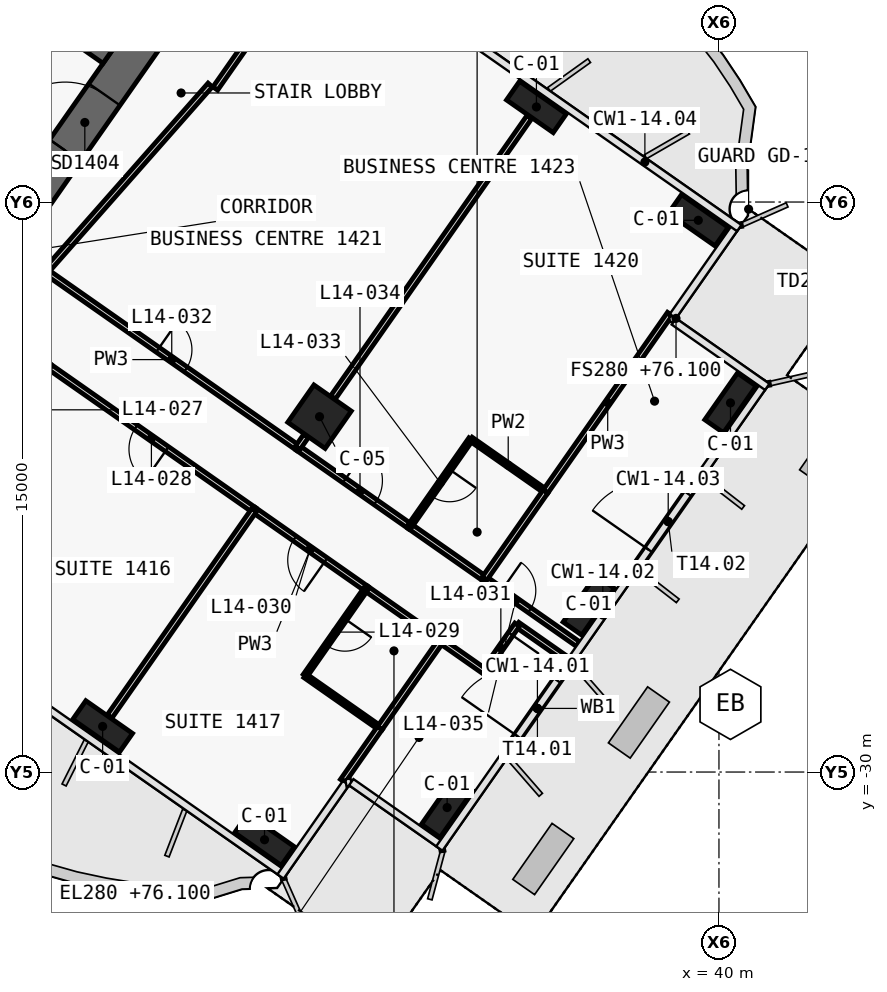
"""IFC4 building model, lengths in metres.
Left out: names, types, materials, properties, quantities, classifications, styles, units other than length and angle.
Written with IfcOpenShell. Run it as: python <this file> out.ifc"""

import sys

from ifc_helpers import new_model, si_unit, direction, frame, frame_2d, origin, origin_2d, place, context, subcontext, project, spatial, polyline, rectangle, outline, extrude, element, fill, save


model = new_model("IFC4")
c1 = context("Model", 3, precision=1e-05, world=origin(), true_north=direction((0.0, 1.0)))
c2 = subcontext(c1, "Body", "Model", "MODEL_VIEW")
j1 = project(units=[si_unit("LENGTHUNIT", "METRE"), si_unit("PLANEANGLEUNIT", "RADIAN")], contexts=[c1])
p1 = place(None, origin())
s1 = spatial("IfcSite", under=j1, at=p1, CompositionType="ELEMENT")
p2 = place(p1, origin())
s2 = spatial("IfcBuilding", under=s1, at=p2, CompositionType="ELEMENT")
p3 = place(p2, frame((0.0, 0.0, 76.1)))
s3 = spatial("IfcBuildingStorey", under=s2, at=p3, CompositionType="ELEMENT", Elevation=76.1)
p4 = place(p3, frame((21.708, -15.2, 0.0), z_axis=(0.0, 0.0, 1.0), x_axis=(0.573576324356, 0.819152122709, 0.0)))
e1 = element("IfcWall", 1, at=p4, inside=s3, PredefinedType="SHEAR", context=c2, shape_type="SweptSolid", body=[
    extrude(outline(polyline([(9.2, 0.5), (0.0, 0.5), (0.0, -0.5), (9.2, -0.5), (9.2, 0.5)])), origin(), (0.0, 0.0, 1.0), 3.6),
])
p5 = place(p4, frame((6.1, 0.0, 0.0)))
e2 = element("IfcOpeningElement", 2, at=p5, cuts=e1, PredefinedType="OPENING", context=c2, shape_type="SweptSolid", body=[
    extrude(rectangle(XDim=1.8, YDim=2.1, at=frame_2d((0.9, 1.05))), frame((0.0, 0.51, 0.0), z_axis=(0.0, -1.0, 0.0), x_axis=(1.0, 0.0, 0.0)), (0.0, 0.0, 1.0), 1.02),
])
p6 = place(p4, frame((1.9, 0.0, 0.0)))
e3 = element("IfcOpeningElement", 3, at=p6, cuts=e1, PredefinedType="OPENING", context=c2, shape_type="SweptSolid", body=[
    extrude(rectangle(XDim=1.8, YDim=2.1, at=frame_2d((0.9, 1.05))), frame((0.0, 0.51, 0.0), z_axis=(0.0, -1.0, 0.0), x_axis=(1.0, 0.0, 0.0)), (0.0, 0.0, 1.0), 1.02),
])
p7 = place(p3, frame((2.638, 3.768, 0.0), z_axis=(0.0, 0.0, 1.0), x_axis=(0.819148977158, -0.573580816643, 0.0)))
e4 = element("IfcWall", 4, at=p7, inside=s3, PredefinedType="SHEAR", context=c2, shape_type="SweptSolid", body=[
    extrude(outline(polyline([(0.0, 0.25), (0.0, -0.25), (26.0, -0.25), (26.0, 0.25), (0.0, 0.25)])), origin(), (0.0, 0.0, 1.0), 3.6),
])
p8 = place(p7, frame((9.637, 0.0, 0.0)))
e5 = element("IfcOpeningElement", 5, at=p8, cuts=e4, PredefinedType="OPENING", context=c2, shape_type="SweptSolid", body=[
    extrude(rectangle(XDim=1.2, YDim=2.1, at=frame_2d((0.6, 1.05))), frame((0.0, 0.26, 0.0), z_axis=(0.0, -1.0, 0.0), x_axis=(1.0, 0.0, 0.0)), (0.0, 0.0, 1.0), 0.52),
])
p9 = place(p7, frame((11.812, 0.0, 0.0)))
e6 = element("IfcOpeningElement", 6, at=p9, cuts=e4, PredefinedType="OPENING", context=c2, shape_type="SweptSolid", body=[
    extrude(rectangle(XDim=1.2, YDim=2.1, at=frame_2d((0.6, 1.05))), frame((0.0, 0.26, 0.0), z_axis=(0.0, -1.0, 0.0), x_axis=(1.0, 0.0, 0.0)), (0.0, 0.0, 1.0), 0.52),
])
p10 = place(p7, frame((13.988, 0.0, 0.0)))
e7 = element("IfcOpeningElement", 7, at=p10, cuts=e4, PredefinedType="OPENING", context=c2, shape_type="SweptSolid", body=[
    extrude(rectangle(XDim=1.2, YDim=2.1, at=frame_2d((0.6, 1.05))), frame((0.0, 0.26, 0.0), z_axis=(0.0, -1.0, 0.0), x_axis=(1.0, 0.0, 0.0)), (0.0, 0.0, 1.0), 0.52),
])
p11 = place(p7, frame((16.262, 0.0, 0.0)))
e8 = element("IfcOpeningElement", 8, at=p11, cuts=e4, PredefinedType="OPENING", context=c2, shape_type="SweptSolid", body=[
    extrude(rectangle(XDim=1.0, YDim=2.1, at=frame_2d((0.5, 1.05))), frame((0.0, 0.26, 0.0), z_axis=(0.0, -1.0, 0.0), x_axis=(1.0, 0.0, 0.0)), (0.0, 0.0, 1.0), 0.52),
])
for number, where, z_axis, x_axis in (
    (9, (23.782, -28.799, 0.0), (0.0, 0.0, 1.0), (0.819, -0.574, 0.0)),
    (10, (28.042, -31.782, 0.0), (0.0, 0.0, 1.0), (0.819, -0.574, 0.0)),
    (11, (35.197, -12.498, 0.0), (0.0, 0.0, 1.0), (0.819, -0.574, 0.0)),
    (12, (39.456, -15.481, 0.0), (0.0, 0.0, 1.0), (0.819, -0.574, 0.0)),
    (13, (32.847, -30.935, 0.0), (0.0, 0.0, 1.0), (0.574, 0.819, 0.0)),
    (14, (36.575, -25.61, 0.0), (0.0, 0.0, 1.0), (0.574, 0.819, 0.0)),
    (15, (40.303, -20.286, 0.0), (0.0, 0.0, 1.0), (0.574, 0.819, 0.0)),
):
    element("IfcColumn", number, at=place(p3, frame(where, z_axis=z_axis, x_axis=x_axis)), inside=s3, PredefinedType="COLUMN", context=c2, shape_type="SweptSolid", body=[
        extrude(rectangle(XDim=1.5, YDim=0.6, at=origin_2d()), origin(), (0.0, 0.0, 1.0), 3.6),
    ])
p12 = place(p3, frame((29.49, -20.649, 0.0), z_axis=(0.0, 0.0, 1.0), x_axis=(0.819152044289, -0.573576436351, 0.0)))
e16 = element("IfcColumn", 16, at=p12, inside=s3, PredefinedType="COLUMN", context=c2, shape_type="SweptSolid", body=[
    extrude(rectangle(XDim=1.2, YDim=1.2, at=origin_2d()), origin(), (0.0, 0.0, 1.0), 3.6),
])
p13 = place(p3, frame((34.38, -29.53, 0.0), z_axis=(0.0, 0.0, 1.0), x_axis=(0.573584953252, 0.819146080625, 0.0)))
e17 = element("IfcWall", 17, at=p13, inside=s3, PredefinedType="SOLIDWALL", context=c2, shape_type="SweptSolid", body=[
    extrude(rectangle(XDim=2.94, YDim=0.2, at=frame_2d((1.47, 0.0))), origin(), (0.0, 0.0, 1.0), 3.32),
])
p14 = place(p13, frame((0.57, 0.0, 0.0)))
e18 = element("IfcOpeningElement", 18, at=p14, cuts=e17, PredefinedType="OPENING", context=c2, shape_type="SweptSolid", body=[
    extrude(rectangle(XDim=1.8, YDim=2.4, at=frame_2d((0.9, 1.2))), frame((0.0, 0.11, 0.0), z_axis=(0.0, -1.0, 0.0), x_axis=(1.0, 0.0, 0.0)), (0.0, 0.0, 1.0), 0.22),
])
p15 = place(p3, frame((37.821, -24.615, 0.0), z_axis=(0.0, 0.0, 1.0), x_axis=(0.573584953252, 0.819146080625, 0.0)))
e19 = element("IfcWall", 19, at=p15, inside=s3, PredefinedType="SOLIDWALL", context=c2, shape_type="SweptSolid", body=[
    extrude(rectangle(XDim=2.94, YDim=0.2, at=frame_2d((1.47, 0.0))), origin(), (0.0, 0.0, 1.0), 3.32),
])
p16 = place(p15, frame((0.57, 0.0, 0.0)))
e20 = element("IfcOpeningElement", 20, at=p16, cuts=e19, PredefinedType="OPENING", context=c2, shape_type="SweptSolid", body=[
    extrude(rectangle(XDim=1.8, YDim=2.4, at=frame_2d((0.9, 1.2))), frame((0.0, 0.11, 0.0), z_axis=(0.0, -1.0, 0.0), x_axis=(1.0, 0.0, 0.0)), (0.0, 0.0, 1.0), 0.22),
])
p17 = place(p3, frame((22.284, -16.824, 0.0), z_axis=(0.0, 0.0, 1.0), x_axis=(0.819152599934, -0.573575642807, 0.0)))
e21 = element("IfcWall", 21, at=p17, inside=s3, PredefinedType="PARTITIONING", context=c2, shape_type="SweptSolid", body=[
    extrude(rectangle(XDim=8.098, YDim=0.15, at=frame_2d((4.049, 0.0))), origin(), (0.0, 0.0, 1.0), 2.6),
])
p18 = place(p17, frame((3.599, 0.0, 0.0)))
e22 = element("IfcOpeningElement", 22, at=p18, cuts=e21, PredefinedType="OPENING", context=c2, shape_type="SweptSolid", body=[
    extrude(rectangle(XDim=0.9, YDim=2.1, at=frame_2d((0.45, 1.05))), frame((0.0, 0.085, 0.0), z_axis=(0.0, -1.0, 0.0), x_axis=(1.0, 0.0, 0.0)), (0.0, 0.0, 1.0), 0.17),
])
p19 = place(p3, frame((28.914, -21.467, 0.0), z_axis=(0.0, 0.0, 1.0), x_axis=(0.819145961204, -0.573585123798, 0.0)))
e23 = element("IfcWall", 23, at=p19, inside=s3, PredefinedType="PARTITIONING", context=c2, shape_type="SweptSolid", body=[
    extrude(rectangle(XDim=3.603, YDim=0.15, at=frame_2d((1.802, 0.0))), origin(), (0.0, 0.0, 1.0), 2.6),
])
p20 = place(p19, frame((1.502, 0.0, 0.0)))
e24 = element("IfcOpeningElement", 24, at=p20, cuts=e23, PredefinedType="OPENING", context=c2, shape_type="SweptSolid", body=[
    extrude(rectangle(XDim=1.0, YDim=2.1, at=frame_2d((0.5, 1.05))), frame((0.0, 0.085, 0.0), z_axis=(0.0, -1.0, 0.0), x_axis=(1.0, 0.0, 0.0)), (0.0, 0.0, 1.0), 0.17),
])
p21 = place(p3, frame((31.863, -23.531, 0.0), z_axis=(0.0, 0.0, 1.0), x_axis=(0.819146032251, -0.573585022335, 0.0)))
e25 = element("IfcWall", 25, at=p21, inside=s3, PredefinedType="PARTITIONING", context=c2, shape_type="SweptSolid", body=[
    extrude(rectangle(XDim=2.404, YDim=0.15, at=frame_2d((1.202, 0.0))), origin(), (0.0, 0.0, 1.0), 3.32),
])
p22 = place(p3, frame((33.829, -24.908, 0.0), z_axis=(0.0, 0.0, 1.0), x_axis=(0.81915932427, -0.57356603932, 0.0)))
e26 = element("IfcWall", 26, at=p22, inside=s3, PredefinedType="PARTITIONING", context=c2, shape_type="SweptSolid", body=[
    extrude(rectangle(XDim=3.002, YDim=0.15, at=frame_2d((1.501, 0.0))), origin(), (0.0, 0.0, 1.0), 2.5),
])
p23 = place(p22, frame((0.551, 0.0, 0.0)))
e27 = element("IfcOpeningElement", 27, at=p23, cuts=e26, PredefinedType="OPENING", context=c2, shape_type="SweptSolid", body=[
    extrude(rectangle(XDim=0.9, YDim=2.1, at=frame_2d((0.45, 1.05))), frame((0.0, 0.085, 0.0), z_axis=(0.0, -1.0, 0.0), x_axis=(1.0, 0.0, 0.0)), (0.0, 0.0, 1.0), 0.17),
])
p24 = place(p3, frame((27.771, -23.107, 0.0), z_axis=(0.0, 0.0, 1.0), x_axis=(-0.819153746897, 0.573574004767, 0.0)))
e28 = element("IfcWall", 28, at=p24, inside=s3, PredefinedType="PARTITIONING", context=c2, shape_type="SweptSolid", body=[
    extrude(rectangle(XDim=6.603, YDim=0.15, at=frame_2d((3.302, 0.0))), origin(), (0.0, 0.0, 1.0), 2.6),
])
p25 = place(p24, frame((2.802, 0.0, 0.0)))
e29 = element("IfcOpeningElement", 29, at=p25, cuts=e28, PredefinedType="OPENING", context=c2, shape_type="SweptSolid", body=[
    extrude(rectangle(XDim=1.0, YDim=2.1, at=frame_2d((0.5, 1.05))), frame((0.0, 0.085, 0.0), z_axis=(0.0, -1.0, 0.0), x_axis=(1.0, 0.0, 0.0)), (0.0, 0.0, 1.0), 0.17),
])
p26 = place(p3, frame((30.719, -25.172, 0.0), z_axis=(0.0, 0.0, 1.0), x_axis=(-0.819145961204, 0.573585123798, 0.0)))
e30 = element("IfcWall", 30, at=p26, inside=s3, PredefinedType="PARTITIONING", context=c2, shape_type="SweptSolid", body=[
    extrude(rectangle(XDim=3.603, YDim=0.15, at=frame_2d((1.802, 0.0))), origin(), (0.0, 0.0, 1.0), 2.6),
])
p27 = place(p26, frame((1.301, 0.0, 0.0)))
e31 = element("IfcOpeningElement", 31, at=p27, cuts=e30, PredefinedType="OPENING", context=c2, shape_type="SweptSolid", body=[
    extrude(rectangle(XDim=1.0, YDim=2.1, at=frame_2d((0.5, 1.05))), frame((0.0, 0.085, 0.0), z_axis=(0.0, -1.0, 0.0), x_axis=(1.0, 0.0, 0.0)), (0.0, 0.0, 1.0), 0.17),
])
p28 = place(p3, frame((32.685, -26.549, 0.0), z_axis=(0.0, 0.0, 1.0), x_axis=(-0.819146032251, 0.573585022335, 0.0)))
e32 = element("IfcWall", 32, at=p28, inside=s3, PredefinedType="PARTITIONING", context=c2, shape_type="SweptSolid", body=[
    extrude(rectangle(XDim=2.404, YDim=0.15, at=frame_2d((1.202, 0.0))), origin(), (0.0, 0.0, 1.0), 3.32),
])
p29 = place(p3, frame((36.001, -27.04, 0.0), z_axis=(0.0, 0.0, 1.0), x_axis=(-0.819059844958, 0.573708088123, 0.0)))
e33 = element("IfcWall", 33, at=p29, inside=s3, PredefinedType="PARTITIONING", context=c2, shape_type="SweptSolid", body=[
    extrude(rectangle(XDim=1.6, YDim=0.15, at=frame_2d((0.8, 0.0))), origin(), (0.0, 0.0, 1.0), 2.5),
])
p30 = place(p3, frame((34.691, -26.122, 0.0), z_axis=(0.0, 0.0, 1.0), x_axis=(-0.573669850876, -0.819086626796, 0.0)))
e34 = element("IfcWall", 34, at=p30, inside=s3, PredefinedType="PARTITIONING", context=c2, shape_type="SweptSolid", body=[
    extrude(rectangle(XDim=1.5, YDim=0.15, at=frame_2d((0.75, 0.0))), origin(), (0.0, 0.0, 1.0), 3.32),
])
p31 = place(p30, frame((0.3, 0.0, 0.0)))
e35 = element("IfcOpeningElement", 35, at=p31, cuts=e34, PredefinedType="OPENING", context=c2, shape_type="SweptSolid", body=[
    extrude(rectangle(XDim=0.9, YDim=2.1, at=frame_2d((0.45, 1.05))), frame((0.0, 0.085, 0.0), z_axis=(0.0, -1.0, 0.0), x_axis=(1.0, 0.0, 0.0)), (0.0, 0.0, 1.0), 0.17),
])
p32 = place(p3, frame((33.83, -27.351, 0.0), z_axis=(0.0, 0.0, 1.0), x_axis=(-0.819133738125, 0.573602579375, 0.0)))
e36 = element("IfcWall", 36, at=p32, inside=s3, PredefinedType="PARTITIONING", context=c2, shape_type="SweptSolid", body=[
    extrude(rectangle(XDim=1.402, YDim=0.15, at=frame_2d((0.701, 0.0))), origin(), (0.0, 0.0, 1.0), 3.32),
])
p33 = place(p3, frame((35.013, -12.76, 0.0), z_axis=(0.0, 0.0, 1.0), x_axis=(-0.573558725113, -0.819164445546, 0.0)))
e37 = element("IfcWall", 37, at=p33, inside=s3, PredefinedType="PARTITIONING", context=c2, shape_type="SweptSolid", body=[
    extrude(rectangle(XDim=9.01, YDim=0.15, at=frame_2d((4.505, 0.0))), origin(), (0.0, 0.0, 1.0), 2.6),
])
p34 = place(p3, frame((29.134, -21.156, 0.0), z_axis=(0.0, 0.0, 1.0), x_axis=(-0.572944929411, -0.819593867633, 0.0)))
e38 = element("IfcWall", 38, at=p34, inside=s3, PredefinedType="PARTITIONING", context=c2, shape_type="SweptSolid", body=[
    extrude(rectangle(XDim=0.38, YDim=0.15, at=frame_2d((0.19, 0.0))), origin(), (0.0, 0.0, 1.0), 2.6),
])
p35 = place(p3, frame((22.285, -16.825, 0.0), z_axis=(0.0, 0.0, 1.0), x_axis=(0.661551268245, 0.749899939647, 0.0)))
e39 = element("IfcWall", 39, at=p35, inside=s3, PredefinedType="PARTITIONING", context=c2, shape_type="SweptSolid", body=[
    extrude(rectangle(XDim=6.541, YDim=0.15, at=frame_2d((3.271, 0.0))), origin(), (0.0, 0.0, 1.0), 2.6),
])
p36 = place(p3, frame((26.746, -12.014, 0.0), z_axis=(0.0, 0.0, 1.0), x_axis=(0.573560650686, 0.819163097304, 0.0)))
e40 = element("IfcWall", 40, at=p36, inside=s3, PredefinedType="PARTITIONING", context=c2, shape_type="SweptSolid", body=[
    extrude(rectangle(XDim=3.0, YDim=0.15, at=frame_2d((1.5, 0.0))), origin(), (0.0, 0.0, 1.0), 3.32),
])
p37 = place(p3, frame((35.438, -22.615, 0.0), z_axis=(0.0, 0.0, 1.0), x_axis=(-0.819141114317, 0.573592045652, 0.0)))
e41 = element("IfcWall", 41, at=p37, inside=s3, PredefinedType="PARTITIONING", context=c2, shape_type="SweptSolid", body=[
    extrude(rectangle(XDim=2.4, YDim=0.12, at=frame_2d((1.2, 0.0))), origin(), (0.0, 0.0, 1.0), 3.32),
])
p38 = place(p3, frame((33.47, -21.239, 0.0), z_axis=(0.0, 0.0, 1.0), x_axis=(-0.573550118428, -0.819170471667, 0.0)))
e42 = element("IfcWall", 42, at=p38, inside=s3, PredefinedType="PARTITIONING", context=c2, shape_type="SweptSolid", body=[
    extrude(rectangle(XDim=2.8, YDim=0.12, at=frame_2d((1.4, 0.0))), origin(), (0.0, 0.0, 1.0), 2.6),
])
p39 = place(p38, frame((0.975, 0.0, 0.0)))
e43 = element("IfcOpeningElement", 43, at=p39, cuts=e42, PredefinedType="OPENING", context=c2, shape_type="SweptSolid", body=[
    extrude(rectangle(XDim=0.85, YDim=2.05, at=frame_2d((0.425, 1.025))), frame((0.0, 0.07, 0.0), z_axis=(0.0, -1.0, 0.0), x_axis=(1.0, 0.0, 0.0)), (0.0, 0.0, 1.0), 0.14),
])
p40 = place(p3, frame((38.708, -17.945, 0.0), z_axis=(0.0, 0.0, 1.0), x_axis=(-0.573568678046, -0.819157476658, 0.0)))
e44 = element("IfcWall", 44, at=p40, inside=s3, PredefinedType="PARTITIONING", context=c2, shape_type="SweptSolid", body=[
    extrude(rectangle(XDim=5.701, YDim=0.15, at=frame_2d((2.851, 0.0))), origin(), (0.0, 0.0, 1.0), 3.32),
])
p41 = place(p3, frame((35.437, -22.616, 0.0), z_axis=(0.0, 0.0, 1.0), x_axis=(-0.573550118428, -0.819170471667, 0.0)))
e45 = element("IfcWall", 45, at=p41, inside=s3, PredefinedType="PARTITIONING", context=c2, shape_type="SweptSolid", body=[
    extrude(rectangle(XDim=2.8, YDim=0.15, at=frame_2d((1.4, 0.0))), origin(), (0.0, 0.0, 1.0), 2.6),
])
p42 = place(p3, frame((27.769, -23.106, 0.0), z_axis=(0.0, 0.0, 1.0), x_axis=(-0.57359826181, -0.819136761505, 0.0)))
e46 = element("IfcWall", 46, at=p42, inside=s3, PredefinedType="PARTITIONING", context=c2, shape_type="SweptSolid", body=[
    extrude(rectangle(XDim=6.63, YDim=0.15, at=frame_2d((3.315, 0.0))), origin(), (0.0, 0.0, 1.0), 2.6),
])
p43 = place(p3, frame((30.717, -25.17, 0.0), z_axis=(0.0, 0.0, 1.0), x_axis=(-0.573550118428, -0.819170471667, 0.0)))
e47 = element("IfcWall", 47, at=p43, inside=s3, PredefinedType="PARTITIONING", context=c2, shape_type="SweptSolid", body=[
    extrude(rectangle(XDim=2.8, YDim=0.12, at=frame_2d((1.4, 0.0))), origin(), (0.0, 0.0, 1.0), 3.32),
])
p44 = place(p43, frame((0.975, 0.0, 0.0)))
e48 = element("IfcOpeningElement", 48, at=p44, cuts=e47, PredefinedType="OPENING", context=c2, shape_type="SweptSolid", body=[
    extrude(rectangle(XDim=0.85, YDim=2.05, at=frame_2d((0.425, 1.025))), frame((0.0, 0.07, 0.0), z_axis=(0.0, -1.0, 0.0), x_axis=(1.0, 0.0, 0.0)), (0.0, 0.0, 1.0), 0.14),
])
p45 = place(p3, frame((29.111, -27.466, 0.0), z_axis=(0.0, 0.0, 1.0), x_axis=(0.819188907105, -0.573523787192, 0.0)))
e49 = element("IfcWall", 49, at=p45, inside=s3, PredefinedType="PARTITIONING", context=c2, shape_type="SweptSolid", body=[
    extrude(rectangle(XDim=2.4, YDim=0.12, at=frame_2d((1.2, 0.0))), origin(), (0.0, 0.0, 1.0), 3.32),
])
p46 = place(p3, frame((31.077, -28.842, 0.0), z_axis=(0.0, 0.0, 1.0), x_axis=(-0.573597175316, -0.819137522318, 0.0)))
e50 = element("IfcWall", 50, at=p46, inside=s3, PredefinedType="PARTITIONING", context=c2, shape_type="SweptSolid", body=[
    extrude(rectangle(XDim=1.701, YDim=0.15, at=frame_2d((0.851, 0.0))), origin(), (0.0, 0.0, 1.0), 3.32),
])
p47 = place(p3, frame((32.684, -26.548, 0.0), z_axis=(0.0, 0.0, 1.0), x_axis=(-0.573550118428, -0.819170471667, 0.0)))
e51 = element("IfcWall", 51, at=p47, inside=s3, PredefinedType="PARTITIONING", context=c2, shape_type="SweptSolid", body=[
    extrude(rectangle(XDim=2.8, YDim=0.15, at=frame_2d((1.4, 0.0))), origin(), (0.0, 0.0, 1.0), 3.32),
])
p48 = place(p6, origin())
e52 = element("IfcDoor", 52, at=p48, inside=s3, OperationType="DOUBLE_DOOR_SINGLE_SWING", PredefinedType="DOOR", context=c2, shape_type="SweptSolid", body=[
    extrude(rectangle(XDim=1.8, YDim=2.1, at=frame_2d((0.9, 1.05))), frame((0.0, 0.025, 0.0), z_axis=(0.0, -1.0, 0.0), x_axis=(1.0, 0.0, 0.0)), (0.0, 0.0, 1.0), 0.05),
])
fill(e3, e52)
p49 = place(p14, origin())
e53 = element("IfcDoor", 53, at=p49, inside=s3, OperationType="DOUBLE_DOOR_DOUBLE_SWING", PredefinedType="DOOR", context=c2, shape_type="SweptSolid", body=[
    extrude(rectangle(XDim=1.8, YDim=2.4, at=frame_2d((0.9, 1.2))), frame((0.0, 0.025, 0.0), z_axis=(0.0, -1.0, 0.0), x_axis=(1.0, 0.0, 0.0)), (0.0, 0.0, 1.0), 0.05),
])
fill(e18, e53)
p50 = place(p16, origin())
e54 = element("IfcDoor", 54, at=p50, inside=s3, OperationType="DOUBLE_DOOR_DOUBLE_SWING", PredefinedType="DOOR", context=c2, shape_type="SweptSolid", body=[
    extrude(rectangle(XDim=1.8, YDim=2.4, at=frame_2d((0.9, 1.2))), frame((0.0, 0.025, 0.0), z_axis=(0.0, -1.0, 0.0), x_axis=(1.0, 0.0, 0.0)), (0.0, 0.0, 1.0), 0.05),
])
fill(e20, e54)
p51 = place(p25, origin())
e55 = element("IfcDoor", 55, at=p51, inside=s3, OperationType="SINGLE_SWING_LEFT", PredefinedType="DOOR", context=c2, shape_type="SweptSolid", body=[
    extrude(rectangle(XDim=1.0, YDim=2.1, at=frame_2d((0.5, 1.05))), frame((0.0, 0.025, 0.0), z_axis=(0.0, -1.0, 0.0), x_axis=(1.0, 0.0, 0.0)), (0.0, 0.0, 1.0), 0.05),
])
fill(e29, e55)
p52 = place(p44, origin())
e56 = element("IfcDoor", 56, at=p52, inside=s3, OperationType="SINGLE_SWING_LEFT", PredefinedType="DOOR", context=c2, shape_type="SweptSolid", body=[
    extrude(rectangle(XDim=0.85, YDim=2.05, at=frame_2d((0.425, 1.025))), frame((0.0, 0.025, 0.0), z_axis=(0.0, -1.0, 0.0), x_axis=(1.0, 0.0, 0.0)), (0.0, 0.0, 1.0), 0.05),
])
fill(e48, e56)
p53 = place(p27, origin())
e57 = element("IfcDoor", 57, at=p53, inside=s3, OperationType="SINGLE_SWING_RIGHT", PredefinedType="DOOR", context=c2, shape_type="SweptSolid", body=[
    extrude(rectangle(XDim=1.0, YDim=2.1, at=frame_2d((0.5, 1.05))), frame((0.0, 0.025, 0.0), z_axis=(0.0, -1.0, 0.0), x_axis=(1.0, 0.0, 0.0)), (0.0, 0.0, 1.0), 0.05),
])
fill(e31, e57)
p54 = place(p31, origin())
e58 = element("IfcDoor", 58, at=p54, inside=s3, OperationType="SINGLE_SWING_RIGHT", PredefinedType="DOOR", context=c2, shape_type="SweptSolid", body=[
    extrude(rectangle(XDim=0.9, YDim=2.1, at=frame_2d((0.45, 1.05))), frame((0.0, 0.025, 0.0), z_axis=(0.0, -1.0, 0.0), x_axis=(1.0, 0.0, 0.0)), (0.0, 0.0, 1.0), 0.05),
])
fill(e35, e58)
p55 = place(p18, origin())
e59 = element("IfcDoor", 59, at=p55, inside=s3, OperationType="SINGLE_SWING_RIGHT", PredefinedType="DOOR", context=c2, shape_type="SweptSolid", body=[
    extrude(rectangle(XDim=0.9, YDim=2.1, at=frame_2d((0.45, 1.05))), frame((0.0, 0.025, 0.0), z_axis=(0.0, -1.0, 0.0), x_axis=(1.0, 0.0, 0.0)), (0.0, 0.0, 1.0), 0.05),
])
fill(e22, e59)
p56 = place(p39, origin())
e60 = element("IfcDoor", 60, at=p56, inside=s3, OperationType="SINGLE_SWING_LEFT", PredefinedType="DOOR", context=c2, shape_type="SweptSolid", body=[
    extrude(rectangle(XDim=0.85, YDim=2.05, at=frame_2d((0.425, 1.025))), frame((0.0, 0.025, 0.0), z_axis=(0.0, -1.0, 0.0), x_axis=(1.0, 0.0, 0.0)), (0.0, 0.0, 1.0), 0.05),
])
fill(e43, e60)
p57 = place(p20, origin())
e61 = element("IfcDoor", 61, at=p57, inside=s3, OperationType="SINGLE_SWING_RIGHT", PredefinedType="DOOR", context=c2, shape_type="SweptSolid", body=[
    extrude(rectangle(XDim=1.0, YDim=2.1, at=frame_2d((0.5, 1.05))), frame((0.0, 0.025, 0.0), z_axis=(0.0, -1.0, 0.0), x_axis=(1.0, 0.0, 0.0)), (0.0, 0.0, 1.0), 0.05),
])
fill(e24, e61)
p58 = place(p23, origin())
e62 = element("IfcDoor", 62, at=p58, inside=s3, OperationType="SINGLE_SWING_LEFT", PredefinedType="DOOR", context=c2, shape_type="SweptSolid", body=[
    extrude(rectangle(XDim=0.9, YDim=2.1, at=frame_2d((0.45, 1.05))), frame((0.0, 0.025, 0.0), z_axis=(0.0, -1.0, 0.0), x_axis=(1.0, 0.0, 0.0)), (0.0, 0.0, 1.0), 0.05),
])
fill(e27, e62)
save(model, sys.argv[1])
